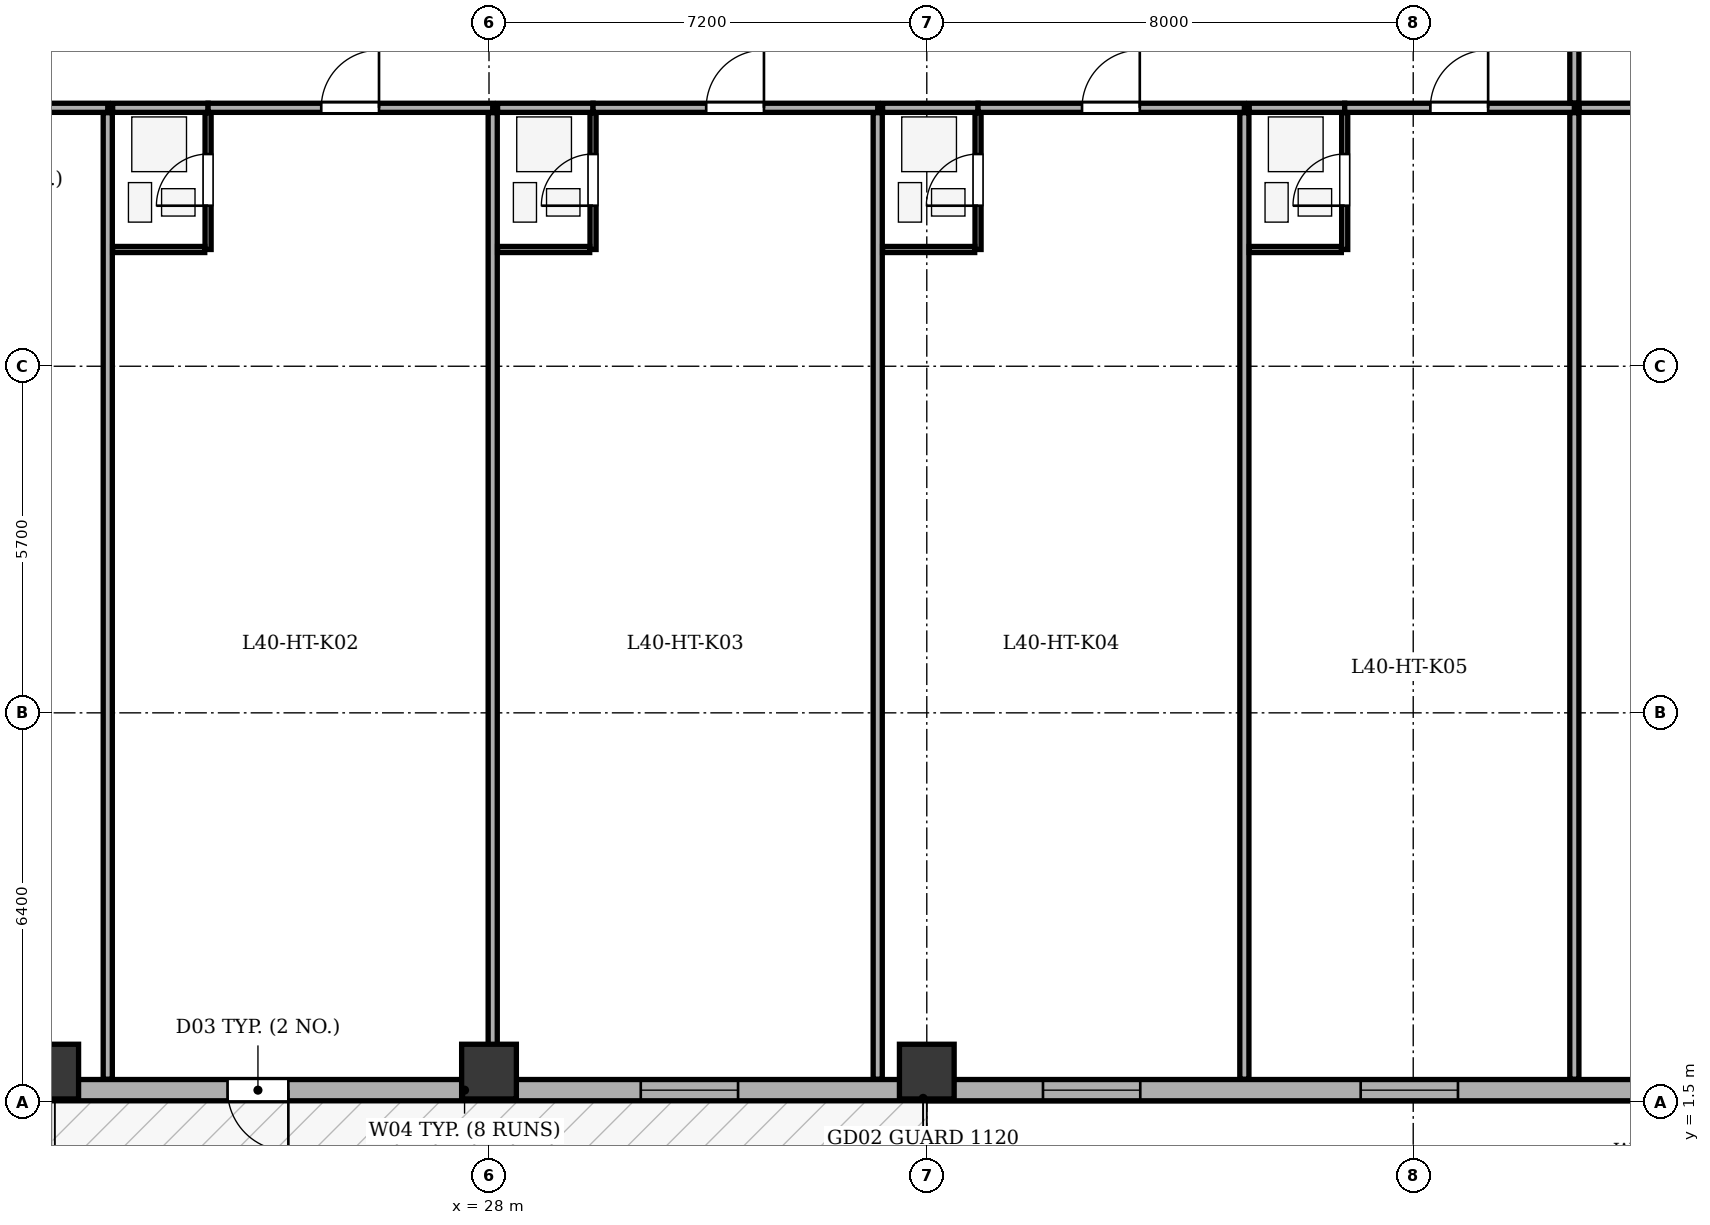
"""IFC4 building model, lengths in metres.
Left out: names, types, materials, properties, quantities, classifications, styles, units other than length and angle.
Written with IfcOpenShell. Run it as: python <this file> out.ifc"""

import sys

from ifc_helpers import new_model, si_unit, direction, frame, frame_2d, origin, origin_2d, place, context, subcontext, project, spatial, rectangle, extrude, element, fill, save


model = new_model("IFC4")
c1 = context("Model", 3, precision=1e-05, world=origin(), true_north=direction((0.0, 1.0)))
c2 = subcontext(c1, "Body", "Model", "MODEL_VIEW")
j1 = project(units=[si_unit("LENGTHUNIT", "METRE"), si_unit("PLANEANGLEUNIT", "RADIAN")], contexts=[c1])
p1 = place(None, origin())
s1 = spatial("IfcSite", under=j1, at=p1, CompositionType="ELEMENT")
p2 = place(p1, origin())
s2 = spatial("IfcBuilding", under=s1, at=p2, CompositionType="ELEMENT")
p3 = place(p2, frame((0.0, 0.0, 158.8)))
s3 = spatial("IfcBuildingStorey", under=s2, at=p3, CompositionType="ELEMENT", Elevation=158.8)
for number, where, z_axis, x_axis in (
    (1, (20.8, 2.0, 0.0), (0.0, 0.0, 1.0), (1.0, 0.0, 0.0)),
    (2, (28.0, 2.0, 0.0), (0.0, 0.0, 1.0), (1.0, 0.0, 0.0)),
    (3, (35.2, 2.0, 0.0), (0.0, 0.0, 1.0), (1.0, 0.0, 0.0)),
):
    element("IfcColumn", number, at=place(p3, frame(where, z_axis=z_axis, x_axis=x_axis)), inside=s3, PredefinedType="COLUMN", context=c2, shape_type="SweptSolid", body=[
        extrude(rectangle(XDim=0.9, YDim=0.9, at=origin_2d()), origin(), (0.0, 0.0, 1.0), 3.5),
    ])
p4 = place(p3, frame((50.7, 1.695, 0.0), z_axis=(0.0, 0.0, 1.0), x_axis=(-1.0, 0.0, 0.0)))
e4 = element("IfcWall", 4, at=p4, inside=s3, PredefinedType="STANDARD", context=c2, shape_type="SweptSolid", body=[
    extrude(rectangle(XDim=35.0, YDim=0.35, at=frame_2d((17.5, 0.0))), origin(), (0.0, 0.0, 1.0), 2.435),
])
p5 = place(p4, frame((26.0, 0.0, 0.0)))
e5 = element("IfcOpeningElement", 5, at=p5, cuts=e4, PredefinedType="OPENING", context=c2, shape_type="SweptSolid", body=[
    extrude(rectangle(XDim=1.0, YDim=2.02, at=frame_2d((0.5, 1.01))), frame((0.0, 0.185, 0.0), z_axis=(0.0, -1.0, 0.0), x_axis=(1.0, 0.0, 0.0)), (0.0, 0.0, 1.0), 0.37),
])
p6 = place(p4, frame((1.775, 0.0, 0.75)))
e6 = element("IfcOpeningElement", 6, at=p6, cuts=e4, PredefinedType="OPENING", context=c2, shape_type="SweptSolid", body=[
    extrude(rectangle(XDim=1.6, YDim=1.565, at=frame_2d((0.8, 0.782))), frame((0.0, 0.185, 0.0), z_axis=(0.0, -1.0, 0.0), x_axis=(1.0, 0.0, 0.0)), (0.0, 0.0, 1.0), 0.37),
])
p7 = place(p4, frame((6.764, 0.0, 0.75)))
e7 = element("IfcOpeningElement", 7, at=p7, cuts=e4, PredefinedType="OPENING", context=c2, shape_type="SweptSolid", body=[
    extrude(rectangle(XDim=1.6, YDim=1.565, at=frame_2d((0.8, 0.782))), frame((0.0, 0.185, 0.0), z_axis=(0.0, -1.0, 0.0), x_axis=(1.0, 0.0, 0.0)), (0.0, 0.0, 1.0), 0.37),
])
p8 = place(p4, frame((11.989, 0.0, 0.75)))
e8 = element("IfcOpeningElement", 8, at=p8, cuts=e4, PredefinedType="OPENING", context=c2, shape_type="SweptSolid", body=[
    extrude(rectangle(XDim=1.6, YDim=1.565, at=frame_2d((0.8, 0.782))), frame((0.0, 0.185, 0.0), z_axis=(0.0, -1.0, 0.0), x_axis=(1.0, 0.0, 0.0)), (0.0, 0.0, 1.0), 0.37),
])
p9 = place(p4, frame((18.604, 0.0, 0.75)))
e9 = element("IfcOpeningElement", 9, at=p9, cuts=e4, PredefinedType="OPENING", context=c2, shape_type="SweptSolid", body=[
    extrude(rectangle(XDim=1.6, YDim=1.565, at=frame_2d((0.8, 0.782))), frame((0.0, 0.185, 0.0), z_axis=(0.0, -1.0, 0.0), x_axis=(1.0, 0.0, 0.0)), (0.0, 0.0, 1.0), 0.37),
])
p10 = place(p4, frame((31.6, 0.0, 0.75)))
e10 = element("IfcOpeningElement", 10, at=p10, cuts=e4, PredefinedType="OPENING", context=c2, shape_type="SweptSolid", body=[
    extrude(rectangle(XDim=1.6, YDim=1.565, at=frame_2d((0.8, 0.782))), frame((0.0, 0.185, 0.0), z_axis=(0.0, -1.0, 0.0), x_axis=(1.0, 0.0, 0.0)), (0.0, 0.0, 1.0), 0.37),
])
p11 = place(p3, frame((17.35, 17.85, 0.0), z_axis=(0.0, 0.0, 1.0), x_axis=(1.0, 0.0, 0.0)))
e11 = element("IfcWall", 11, at=p11, inside=s3, PredefinedType="PARTITIONING", context=c2, shape_type="SweptSolid", body=[
    extrude(rectangle(XDim=4.38, YDim=0.15, at=frame_2d((2.19, 0.0))), origin(), (0.0, 0.0, 1.0), 3.05),
])
p12 = place(p11, frame((1.71, 0.0, 0.0)))
e12 = element("IfcOpeningElement", 12, at=p12, cuts=e11, PredefinedType="OPENING", context=c2, shape_type="SweptSolid", body=[
    extrude(rectangle(XDim=0.95, YDim=2.1, at=frame_2d((0.475, 1.05))), frame((0.0, 0.085, 0.0), z_axis=(0.0, -1.0, 0.0), x_axis=(1.0, 0.0, 0.0)), (0.0, 0.0, 1.0), 0.17),
])
p13 = place(p3, frame((21.73, 1.875, 0.0), z_axis=(0.0, 0.0, 1.0), x_axis=(0.0, 1.0, 0.0)))
e13 = element("IfcWall", 13, at=p13, inside=s3, PredefinedType="PARTITIONING", context=c2, shape_type="SweptSolid", body=[
    extrude(rectangle(XDim=15.895, YDim=0.15, at=frame_2d((7.948, 0.0))), origin(), (0.0, 0.0, 1.0), 3.05),
])
p14 = place(p3, frame((21.81, 17.85, 0.0), z_axis=(0.0, 0.0, 1.0), x_axis=(1.0, 0.0, 0.0)))
e14 = element("IfcWall", 14, at=p14, inside=s3, PredefinedType="PARTITIONING", context=c2, shape_type="SweptSolid", body=[
    extrude(rectangle(XDim=1.57, YDim=0.15, at=frame_2d((0.785, 0.0))), origin(), (0.0, 0.0, 1.0), 3.05),
])
p15 = place(p3, frame((23.38, 17.85, 0.0), z_axis=(0.0, 0.0, 1.0), x_axis=(1.0, 0.0, 0.0)))
e15 = element("IfcWall", 15, at=p15, inside=s3, PredefinedType="PARTITIONING", context=c2, shape_type="SweptSolid", body=[
    extrude(rectangle(XDim=4.681, YDim=0.15, at=frame_2d((2.341, 0.0))), origin(), (0.0, 0.0, 1.0), 3.05),
])
p16 = place(p15, frame((1.861, 0.0, 0.0)))
e16 = element("IfcOpeningElement", 16, at=p16, cuts=e15, PredefinedType="OPENING", context=c2, shape_type="SweptSolid", body=[
    extrude(rectangle(XDim=0.95, YDim=2.1, at=frame_2d((0.475, 1.05))), frame((0.0, 0.085, 0.0), z_axis=(0.0, -1.0, 0.0), x_axis=(1.0, 0.0, 0.0)), (0.0, 0.0, 1.0), 0.17),
])
p17 = place(p3, frame((23.38, 15.52, 0.0), z_axis=(0.0, 0.0, 1.0), x_axis=(0.0, 1.0, 0.0)))
e17 = element("IfcWall", 17, at=p17, inside=s3, PredefinedType="PARTITIONING", context=c2, shape_type="SweptSolid", body=[
    extrude(rectangle(XDim=2.25, YDim=0.1, at=frame_2d((1.125, 0.0))), origin(), (0.0, 0.0, 1.0), 3.05),
])
p18 = place(p17, frame((0.72, 0.0, 0.0)))
e18 = element("IfcOpeningElement", 18, at=p18, cuts=e17, PredefinedType="OPENING", context=c2, shape_type="SweptSolid", body=[
    extrude(rectangle(XDim=0.85, YDim=2.05, at=frame_2d((0.425, 1.025))), frame((0.0, 0.06, 0.0), z_axis=(0.0, -1.0, 0.0), x_axis=(1.0, 0.0, 0.0)), (0.0, 0.0, 1.0), 0.12),
])
p19 = place(p3, frame((21.81, 15.52, 0.0), z_axis=(0.0, 0.0, 1.0), x_axis=(1.0, 0.0, 0.0)))
e19 = element("IfcWall", 19, at=p19, inside=s3, PredefinedType="PARTITIONING", context=c2, shape_type="SweptSolid", body=[
    extrude(rectangle(XDim=1.515, YDim=0.1, at=frame_2d((0.757, 0.0))), origin(), (0.0, 0.0, 1.0), 3.05),
])
p20 = place(p3, frame((28.061, 1.875, 0.0), z_axis=(0.0, 0.0, 1.0), x_axis=(0.0, 1.0, 0.0)))
e20 = element("IfcWall", 20, at=p20, inside=s3, PredefinedType="PARTITIONING", context=c2, shape_type="SweptSolid", body=[
    extrude(rectangle(XDim=15.895, YDim=0.15, at=frame_2d((7.948, 0.0))), origin(), (0.0, 0.0, 1.0), 2.235),
])
p21 = place(p3, frame((28.141, 17.85, 0.0), z_axis=(0.0, 0.0, 1.0), x_axis=(1.0, 0.0, 0.0)))
e21 = element("IfcWall", 21, at=p21, inside=s3, PredefinedType="PARTITIONING", context=c2, shape_type="SweptSolid", body=[
    extrude(rectangle(XDim=1.57, YDim=0.15, at=frame_2d((0.785, 0.0))), origin(), (0.0, 0.0, 1.0), 3.05),
])
p22 = place(p3, frame((29.711, 17.85, 0.0), z_axis=(0.0, 0.0, 1.0), x_axis=(1.0, 0.0, 0.0)))
e22 = element("IfcWall", 22, at=p22, inside=s3, PredefinedType="PARTITIONING", context=c2, shape_type="SweptSolid", body=[
    extrude(rectangle(XDim=4.682, YDim=0.15, at=frame_2d((2.341, 0.0))), origin(), (0.0, 0.0, 1.0), 3.05),
])
p23 = place(p22, frame((1.861, 0.0, 0.0)))
e23 = element("IfcOpeningElement", 23, at=p23, cuts=e22, PredefinedType="OPENING", context=c2, shape_type="SweptSolid", body=[
    extrude(rectangle(XDim=0.95, YDim=2.1, at=frame_2d((0.475, 1.05))), frame((0.0, 0.085, 0.0), z_axis=(0.0, -1.0, 0.0), x_axis=(1.0, 0.0, 0.0)), (0.0, 0.0, 1.0), 0.17),
])
p24 = place(p3, frame((29.711, 15.52, 0.0), z_axis=(0.0, 0.0, 1.0), x_axis=(0.0, 1.0, 0.0)))
e24 = element("IfcWall", 24, at=p24, inside=s3, PredefinedType="PARTITIONING", context=c2, shape_type="SweptSolid", body=[
    extrude(rectangle(XDim=2.25, YDim=0.1, at=frame_2d((1.125, 0.0))), origin(), (0.0, 0.0, 1.0), 2.485),
])
p25 = place(p24, frame((0.72, 0.0, 0.0)))
e25 = element("IfcOpeningElement", 25, at=p25, cuts=e24, PredefinedType="OPENING", context=c2, shape_type="SweptSolid", body=[
    extrude(rectangle(XDim=0.85, YDim=2.05, at=frame_2d((0.425, 1.025))), frame((0.0, 0.06, 0.0), z_axis=(0.0, -1.0, 0.0), x_axis=(1.0, 0.0, 0.0)), (0.0, 0.0, 1.0), 0.12),
])
p26 = place(p3, frame((28.141, 15.52, 0.0), z_axis=(0.0, 0.0, 1.0), x_axis=(1.0, 0.0, 0.0)))
e26 = element("IfcWall", 26, at=p26, inside=s3, PredefinedType="PARTITIONING", context=c2, shape_type="SweptSolid", body=[
    extrude(rectangle(XDim=1.515, YDim=0.1, at=frame_2d((0.757, 0.0))), origin(), (0.0, 0.0, 1.0), 3.05),
])
p27 = place(p3, frame((34.393, 1.875, 0.0), z_axis=(0.0, 0.0, 1.0), x_axis=(0.0, 1.0, 0.0)))
e27 = element("IfcWall", 27, at=p27, inside=s3, PredefinedType="PARTITIONING", context=c2, shape_type="SweptSolid", body=[
    extrude(rectangle(XDim=15.895, YDim=0.15, at=frame_2d((7.948, 0.0))), origin(), (0.0, 0.0, 1.0), 3.05),
])
p28 = place(p3, frame((34.473, 17.85, 0.0), z_axis=(0.0, 0.0, 1.0), x_axis=(1.0, 0.0, 0.0)))
e28 = element("IfcWall", 28, at=p28, inside=s3, PredefinedType="PARTITIONING", context=c2, shape_type="SweptSolid", body=[
    extrude(rectangle(XDim=1.57, YDim=0.15, at=frame_2d((0.785, 0.0))), origin(), (0.0, 0.0, 1.0), 3.05),
])
p29 = place(p3, frame((36.043, 17.85, 0.0), z_axis=(0.0, 0.0, 1.0), x_axis=(1.0, 0.0, 0.0)))
e29 = element("IfcWall", 29, at=p29, inside=s3, PredefinedType="PARTITIONING", context=c2, shape_type="SweptSolid", body=[
    extrude(rectangle(XDim=4.38, YDim=0.15, at=frame_2d((2.19, 0.0))), origin(), (0.0, 0.0, 1.0), 3.05),
])
p30 = place(p29, frame((1.71, 0.0, 0.0)))
e30 = element("IfcOpeningElement", 30, at=p30, cuts=e29, PredefinedType="OPENING", context=c2, shape_type="SweptSolid", body=[
    extrude(rectangle(XDim=0.95, YDim=2.1, at=frame_2d((0.475, 1.05))), frame((0.0, 0.085, 0.0), z_axis=(0.0, -1.0, 0.0), x_axis=(1.0, 0.0, 0.0)), (0.0, 0.0, 1.0), 0.17),
])
p31 = place(p3, frame((36.043, 15.52, 0.0), z_axis=(0.0, 0.0, 1.0), x_axis=(0.0, 1.0, 0.0)))
e31 = element("IfcWall", 31, at=p31, inside=s3, PredefinedType="PARTITIONING", context=c2, shape_type="SweptSolid", body=[
    extrude(rectangle(XDim=2.25, YDim=0.1, at=frame_2d((1.125, 0.0))), origin(), (0.0, 0.0, 1.0), 3.05),
])
p32 = place(p31, frame((0.72, 0.0, 0.0)))
e32 = element("IfcOpeningElement", 32, at=p32, cuts=e31, PredefinedType="OPENING", context=c2, shape_type="SweptSolid", body=[
    extrude(rectangle(XDim=0.85, YDim=2.05, at=frame_2d((0.425, 1.025))), frame((0.0, 0.06, 0.0), z_axis=(0.0, -1.0, 0.0), x_axis=(1.0, 0.0, 0.0)), (0.0, 0.0, 1.0), 0.12),
])
p33 = place(p3, frame((34.473, 15.52, 0.0), z_axis=(0.0, 0.0, 1.0), x_axis=(1.0, 0.0, 0.0)))
e33 = element("IfcWall", 33, at=p33, inside=s3, PredefinedType="PARTITIONING", context=c2, shape_type="SweptSolid", body=[
    extrude(rectangle(XDim=1.515, YDim=0.1, at=frame_2d((0.758, 0.0))), origin(), (0.0, 0.0, 1.0), 3.05),
])
p34 = place(p3, frame((40.423, 1.875, 0.0), z_axis=(0.0, 0.0, 1.0), x_axis=(0.0, 1.0, 0.0)))
e34 = element("IfcWall", 34, at=p34, inside=s3, PredefinedType="PARTITIONING", context=c2, shape_type="SweptSolid", body=[
    extrude(rectangle(XDim=15.895, YDim=0.15, at=frame_2d((7.948, 0.0))), origin(), (0.0, 0.0, 1.0), 2.485),
])
p35 = place(p3, frame((40.503, 17.85, 0.0), z_axis=(0.0, 0.0, 1.0), x_axis=(1.0, 0.0, 0.0)))
e35 = element("IfcWall", 35, at=p35, inside=s3, PredefinedType="PARTITIONING", context=c2, shape_type="SweptSolid", body=[
    extrude(rectangle(XDim=1.57, YDim=0.15, at=frame_2d((0.785, 0.0))), origin(), (0.0, 0.0, 1.0), 3.05),
])
p36 = place(p3, frame((42.073, 17.85, 0.0), z_axis=(0.0, 0.0, 1.0), x_axis=(1.0, 0.0, 0.0)))
e36 = element("IfcWall", 36, at=p36, inside=s3, PredefinedType="PARTITIONING", context=c2, shape_type="SweptSolid", body=[
    extrude(rectangle(XDim=3.777, YDim=0.15, at=frame_2d((1.889, 0.0))), origin(), (0.0, 0.0, 1.0), 3.05),
])
p37 = place(p36, frame((1.409, 0.0, 0.0)))
e37 = element("IfcOpeningElement", 37, at=p37, cuts=e36, PredefinedType="OPENING", context=c2, shape_type="SweptSolid", body=[
    extrude(rectangle(XDim=0.95, YDim=2.1, at=frame_2d((0.475, 1.05))), frame((0.0, 0.085, 0.0), z_axis=(0.0, -1.0, 0.0), x_axis=(1.0, 0.0, 0.0)), (0.0, 0.0, 1.0), 0.17),
])
p38 = place(p3, frame((42.073, 15.52, 0.0), z_axis=(0.0, 0.0, 1.0), x_axis=(0.0, 1.0, 0.0)))
e38 = element("IfcWall", 38, at=p38, inside=s3, PredefinedType="PARTITIONING", context=c2, shape_type="SweptSolid", body=[
    extrude(rectangle(XDim=2.25, YDim=0.1, at=frame_2d((1.125, 0.0))), origin(), (0.0, 0.0, 1.0), 2.485),
])
p39 = place(p38, frame((0.72, 0.0, 0.0)))
e39 = element("IfcOpeningElement", 39, at=p39, cuts=e38, PredefinedType="OPENING", context=c2, shape_type="SweptSolid", body=[
    extrude(rectangle(XDim=0.85, YDim=2.05, at=frame_2d((0.425, 1.025))), frame((0.0, 0.06, 0.0), z_axis=(0.0, -1.0, 0.0), x_axis=(1.0, 0.0, 0.0)), (0.0, 0.0, 1.0), 0.12),
])
p40 = place(p3, frame((40.503, 15.52, 0.0), z_axis=(0.0, 0.0, 1.0), x_axis=(1.0, 0.0, 0.0)))
e40 = element("IfcWall", 40, at=p40, inside=s3, PredefinedType="PARTITIONING", context=c2, shape_type="SweptSolid", body=[
    extrude(rectangle(XDim=1.515, YDim=0.1, at=frame_2d((0.758, 0.0))), origin(), (0.0, 0.0, 1.0), 3.05),
])
p41 = place(p3, frame((45.85, 1.875, 0.0), z_axis=(0.0, 0.0, 1.0), x_axis=(0.0, 1.0, 0.0)))
e41 = element("IfcWall", 41, at=p41, inside=s3, PredefinedType="PARTITIONING", context=c2, shape_type="SweptSolid", body=[
    extrude(rectangle(XDim=15.895, YDim=0.15, at=frame_2d((7.948, 0.0))), origin(), (0.0, 0.0, 1.0), 3.05),
])
p42 = place(p3, frame((45.93, 17.85, 0.0), z_axis=(0.0, 0.0, 1.0), x_axis=(1.0, 0.0, 0.0)))
e42 = element("IfcWall", 42, at=p42, inside=s3, PredefinedType="PARTITIONING", context=c2, shape_type="SweptSolid", body=[
    extrude(rectangle(XDim=9.395, YDim=0.15, at=frame_2d((4.698, 0.0))), origin(), (0.0, 0.0, 1.0), 3.05),
])
p43 = place(p3, frame((45.85, 17.93, 0.0), z_axis=(0.0, 0.0, 1.0), x_axis=(0.0, 1.0, 0.0)))
e43 = element("IfcWall", 43, at=p43, inside=s3, PredefinedType="PARTITIONING", context=c2, shape_type="SweptSolid", body=[
    extrude(rectangle(XDim=6.07, YDim=0.15, at=frame_2d((3.035, 0.0))), origin(), (0.0, 0.0, 1.0), 3.05),
])
p44 = place(p43, frame((2.515, 0.0, 0.0)))
e44 = element("IfcOpeningElement", 44, at=p44, cuts=e43, PredefinedType="OPENING", context=c2, shape_type="SweptSolid", body=[
    extrude(rectangle(XDim=0.95, YDim=2.1, at=frame_2d((0.475, 1.05))), frame((0.0, 0.085, 0.0), z_axis=(0.0, -1.0, 0.0), x_axis=(1.0, 0.0, 0.0)), (0.0, 0.0, 1.0), 0.17),
])
p45 = place(p5, origin())
e45 = element("IfcDoor", 45, at=p45, inside=s3, OperationType="SINGLE_SWING_LEFT", PredefinedType="DOOR", context=c2, shape_type="SweptSolid", body=[
    extrude(rectangle(XDim=1.0, YDim=2.02, at=frame_2d((0.5, 1.01))), frame((0.0, 0.025, 0.0), z_axis=(0.0, -1.0, 0.0), x_axis=(1.0, 0.0, 0.0)), (0.0, 0.0, 1.0), 0.05),
])
fill(e5, e45)
p46 = place(p7, origin())
e46 = element("IfcWindow", 46, at=p46, inside=s3, PartitioningType="SINGLE_PANEL", PredefinedType="WINDOW", context=c2, shape_type="SweptSolid", body=[
    extrude(rectangle(XDim=1.6, YDim=1.565, at=frame_2d((0.8, 0.782))), frame((0.0, -0.01, 0.0), z_axis=(0.0, -1.0, 0.0), x_axis=(1.0, 0.0, 0.0)), (0.0, 0.0, 1.0), 0.06),
])
fill(e7, e46)
p47 = place(p8, origin())
e47 = element("IfcWindow", 47, at=p47, inside=s3, PartitioningType="SINGLE_PANEL", PredefinedType="WINDOW", context=c2, shape_type="SweptSolid", body=[
    extrude(rectangle(XDim=1.6, YDim=1.565, at=frame_2d((0.8, 0.782))), frame((0.0, -0.01, 0.0), z_axis=(0.0, -1.0, 0.0), x_axis=(1.0, 0.0, 0.0)), (0.0, 0.0, 1.0), 0.06),
])
fill(e8, e47)
p48 = place(p9, origin())
e48 = element("IfcWindow", 48, at=p48, inside=s3, PartitioningType="SINGLE_PANEL", PredefinedType="WINDOW", context=c2, shape_type="SweptSolid", body=[
    extrude(rectangle(XDim=1.6, YDim=1.565, at=frame_2d((0.8, 0.782))), frame((0.0, -0.01, 0.0), z_axis=(0.0, -1.0, 0.0), x_axis=(1.0, 0.0, 0.0)), (0.0, 0.0, 1.0), 0.06),
])
fill(e9, e48)
p49 = place(p18, origin())
e49 = element("IfcDoor", 49, at=p49, inside=s3, OperationType="SINGLE_SWING_LEFT", PredefinedType="DOOR", context=c2, shape_type="SweptSolid", body=[
    extrude(rectangle(XDim=0.85, YDim=2.05, at=frame_2d((0.425, 1.025))), frame((0.0, 0.025, 0.0), z_axis=(0.0, -1.0, 0.0), x_axis=(1.0, 0.0, 0.0)), (0.0, 0.0, 1.0), 0.05),
])
fill(e18, e49)
p50 = place(p16, origin())
e50 = element("IfcDoor", 50, at=p50, inside=s3, OperationType="SINGLE_SWING_RIGHT", PredefinedType="DOOR", context=c2, shape_type="SweptSolid", body=[
    extrude(rectangle(XDim=0.95, YDim=2.1, at=frame_2d((0.475, 1.05))), frame((0.0, 0.025, 0.0), z_axis=(0.0, -1.0, 0.0), x_axis=(1.0, 0.0, 0.0)), (0.0, 0.0, 1.0), 0.05),
])
fill(e16, e50)
p51 = place(p25, origin())
e51 = element("IfcDoor", 51, at=p51, inside=s3, OperationType="SINGLE_SWING_LEFT", PredefinedType="DOOR", context=c2, shape_type="SweptSolid", body=[
    extrude(rectangle(XDim=0.85, YDim=2.05, at=frame_2d((0.425, 1.025))), frame((0.0, 0.025, 0.0), z_axis=(0.0, -1.0, 0.0), x_axis=(1.0, 0.0, 0.0)), (0.0, 0.0, 1.0), 0.05),
])
fill(e25, e51)
p52 = place(p23, origin())
e52 = element("IfcDoor", 52, at=p52, inside=s3, OperationType="SINGLE_SWING_RIGHT", PredefinedType="DOOR", context=c2, shape_type="SweptSolid", body=[
    extrude(rectangle(XDim=0.95, YDim=2.1, at=frame_2d((0.475, 1.05))), frame((0.0, 0.025, 0.0), z_axis=(0.0, -1.0, 0.0), x_axis=(1.0, 0.0, 0.0)), (0.0, 0.0, 1.0), 0.05),
])
fill(e23, e52)
p53 = place(p32, origin())
e53 = element("IfcDoor", 53, at=p53, inside=s3, OperationType="SINGLE_SWING_LEFT", PredefinedType="DOOR", context=c2, shape_type="SweptSolid", body=[
    extrude(rectangle(XDim=0.85, YDim=2.05, at=frame_2d((0.425, 1.025))), frame((0.0, 0.025, 0.0), z_axis=(0.0, -1.0, 0.0), x_axis=(1.0, 0.0, 0.0)), (0.0, 0.0, 1.0), 0.05),
])
fill(e32, e53)
p54 = place(p30, origin())
e54 = element("IfcDoor", 54, at=p54, inside=s3, OperationType="SINGLE_SWING_RIGHT", PredefinedType="DOOR", context=c2, shape_type="SweptSolid", body=[
    extrude(rectangle(XDim=0.95, YDim=2.1, at=frame_2d((0.475, 1.05))), frame((0.0, 0.025, 0.0), z_axis=(0.0, -1.0, 0.0), x_axis=(1.0, 0.0, 0.0)), (0.0, 0.0, 1.0), 0.05),
])
fill(e30, e54)
p55 = place(p39, origin())
e55 = element("IfcDoor", 55, at=p55, inside=s3, OperationType="SINGLE_SWING_LEFT", PredefinedType="DOOR", context=c2, shape_type="SweptSolid", body=[
    extrude(rectangle(XDim=0.85, YDim=2.05, at=frame_2d((0.425, 1.025))), frame((0.0, 0.025, 0.0), z_axis=(0.0, -1.0, 0.0), x_axis=(1.0, 0.0, 0.0)), (0.0, 0.0, 1.0), 0.05),
])
fill(e39, e55)
p56 = place(p37, origin())
e56 = element("IfcDoor", 56, at=p56, inside=s3, OperationType="SINGLE_SWING_RIGHT", PredefinedType="DOOR", context=c2, shape_type="SweptSolid", body=[
    extrude(rectangle(XDim=0.95, YDim=2.1, at=frame_2d((0.475, 1.05))), frame((0.0, 0.025, 0.0), z_axis=(0.0, -1.0, 0.0), x_axis=(1.0, 0.0, 0.0)), (0.0, 0.0, 1.0), 0.05),
])
fill(e37, e56)
save(model, sys.argv[1])
